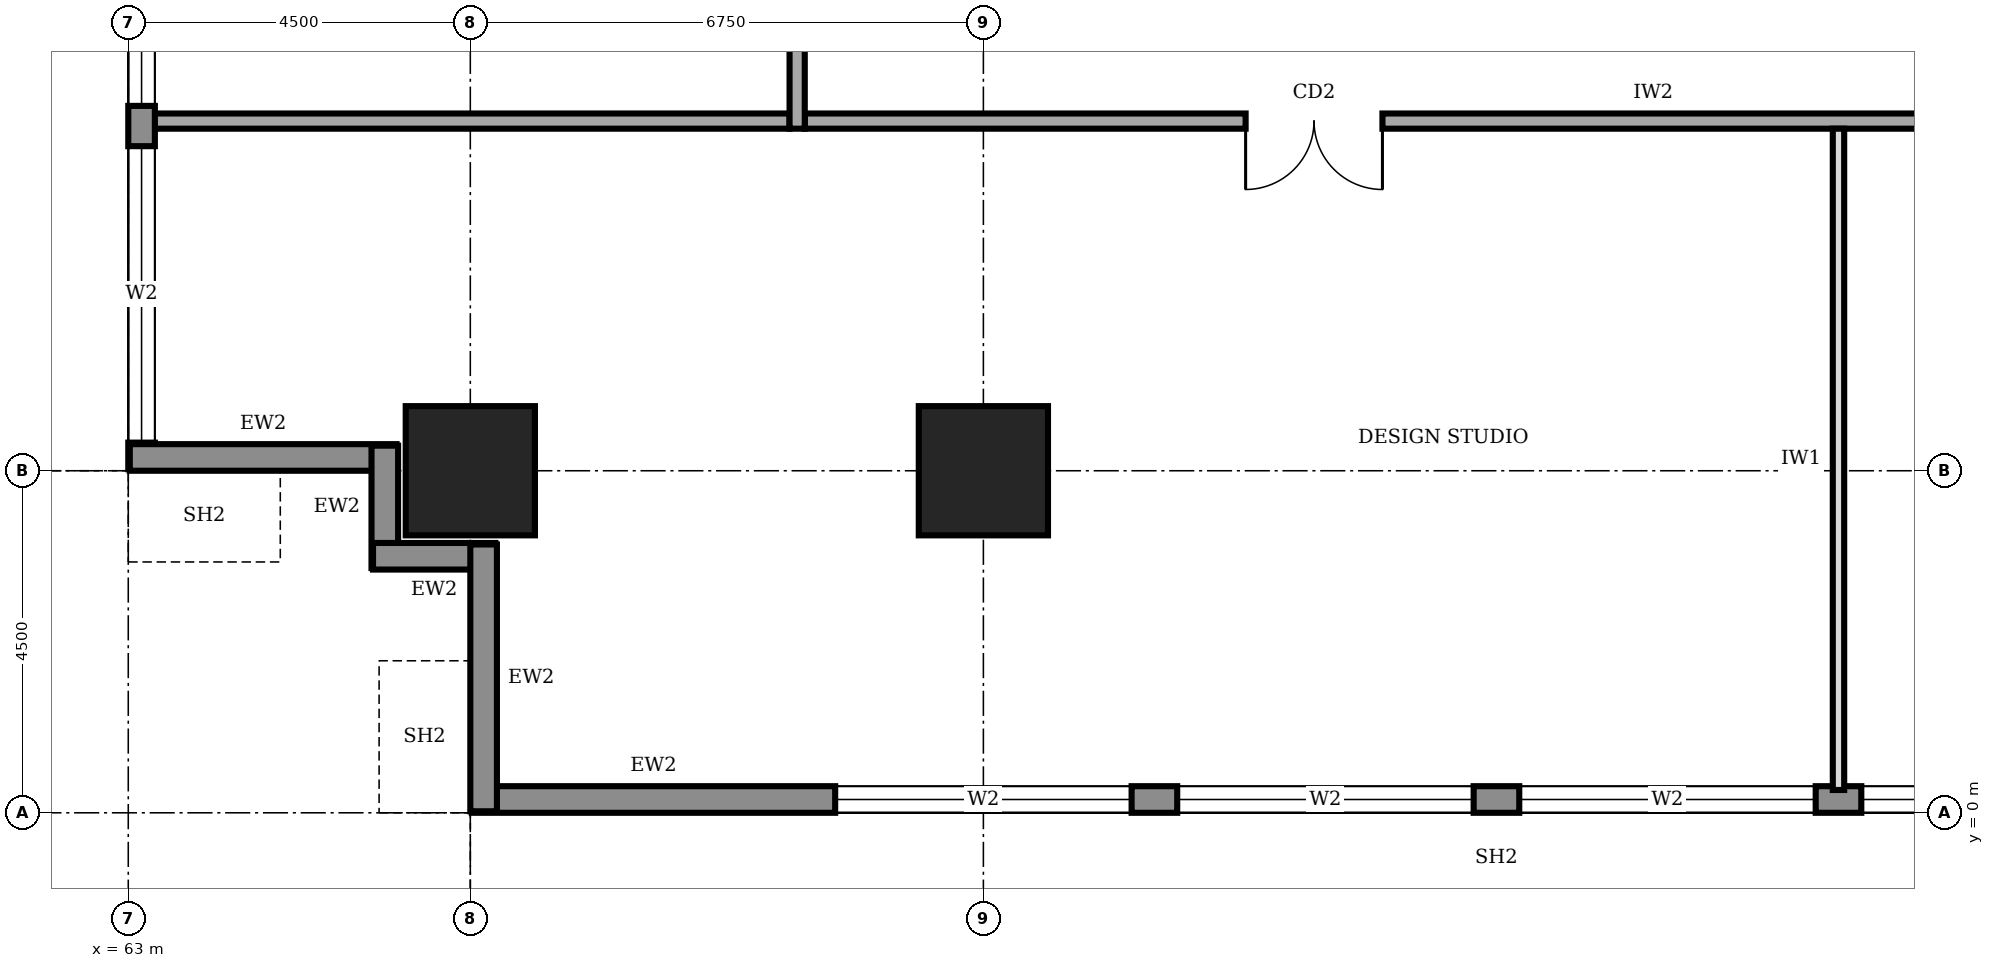
"""IFC4 building model, lengths in metres.
Left out: names, types, materials, properties, quantities, classifications, styles, units other than length and angle.
Written with IfcOpenShell. Run it as: python <this file> out.ifc"""

import sys

from ifc_helpers import new_model, si_unit, direction, frame, frame_2d, origin, origin_2d, place, context, subcontext, project, spatial, rectangle, extrude, element, fill, save


model = new_model("IFC4")
c1 = context("Model", 3, precision=1e-05, world=origin(), true_north=direction((0.0, 1.0)))
c2 = subcontext(c1, "Body", "Model", "MODEL_VIEW")
j1 = project(units=[si_unit("LENGTHUNIT", "METRE"), si_unit("PLANEANGLEUNIT", "RADIAN")], contexts=[c1])
p1 = place(None, origin())
s1 = spatial("IfcSite", under=j1, at=p1, CompositionType="ELEMENT")
p2 = place(p1, origin())
s2 = spatial("IfcBuilding", under=s1, at=p2, CompositionType="ELEMENT")
p3 = place(p2, frame((0.0, 0.0, 53.0)))
s3 = spatial("IfcBuildingStorey", under=s2, at=p3, CompositionType="ELEMENT", Elevation=53.0)
for number, where, z_axis, x_axis in (
    (1, (67.5, 4.5, 0.0), (0.0, 0.0, 1.0), (1.0, 0.0, 0.0)),
    (2, (74.25, 4.5, 0.0), (0.0, 0.0, 1.0), (1.0, 0.0, 0.0)),
):
    element("IfcColumn", number, at=place(p3, frame(where, z_axis=z_axis, x_axis=x_axis)), inside=s3, PredefinedType="COLUMN", context=c2, shape_type="SweptSolid", body=[
        extrude(rectangle(XDim=1.7, YDim=1.7, at=origin_2d()), origin(), (0.0, 0.0, 1.0), 4.0),
    ])
p4 = place(p3, frame((67.52, 0.175, 0.0), z_axis=(0.0, 0.0, 1.0), x_axis=(1.0, 0.0, 0.0)))
e3 = element("IfcWall", 3, at=p4, inside=s3, PredefinedType="STANDARD", context=c2, shape_type="SweptSolid", body=[
    extrude(rectangle(XDim=26.96, YDim=0.35, at=frame_2d((13.48, 0.0))), origin(), (0.0, 0.0, 1.0), 3.75),
])
p5 = place(p4, frame((4.78, 0.0, 0.6)))
e4 = element("IfcOpeningElement", 4, at=p5, cuts=e3, PredefinedType="OPENING", context=c2, shape_type="SweptSolid", body=[
    extrude(rectangle(XDim=3.9, YDim=2.6, at=frame_2d((1.95, 1.3))), frame((0.0, 0.185, 0.0), z_axis=(0.0, -1.0, 0.0), x_axis=(1.0, 0.0, 0.0)), (0.0, 0.0, 1.0), 0.37),
])
p6 = place(p4, frame((9.28, 0.0, 0.6)))
e5 = element("IfcOpeningElement", 5, at=p6, cuts=e3, PredefinedType="OPENING", context=c2, shape_type="SweptSolid", body=[
    extrude(rectangle(XDim=3.9, YDim=2.6, at=frame_2d((1.95, 1.3))), frame((0.0, 0.185, 0.0), z_axis=(0.0, -1.0, 0.0), x_axis=(1.0, 0.0, 0.0)), (0.0, 0.0, 1.0), 0.37),
])
p7 = place(p4, frame((13.78, 0.0, 0.6)))
e6 = element("IfcOpeningElement", 6, at=p7, cuts=e3, PredefinedType="OPENING", context=c2, shape_type="SweptSolid", body=[
    extrude(rectangle(XDim=3.9, YDim=2.6, at=frame_2d((1.95, 1.3))), frame((0.0, 0.185, 0.0), z_axis=(0.0, -1.0, 0.0), x_axis=(1.0, 0.0, 0.0)), (0.0, 0.0, 1.0), 0.37),
])
p8 = place(p4, frame((18.28, 0.0, 0.6)))
e7 = element("IfcOpeningElement", 7, at=p8, cuts=e3, PredefinedType="OPENING", context=c2, shape_type="SweptSolid", body=[
    extrude(rectangle(XDim=3.9, YDim=2.6, at=frame_2d((1.95, 1.3))), frame((0.0, 0.185, 0.0), z_axis=(0.0, -1.0, 0.0), x_axis=(1.0, 0.0, 0.0)), (0.0, 0.0, 1.0), 0.37),
])
p9 = place(p4, frame((22.71, 0.0, 0.6)))
e8 = element("IfcOpeningElement", 8, at=p9, cuts=e3, PredefinedType="OPENING", context=c2, shape_type="SweptSolid", body=[
    extrude(rectangle(XDim=3.9, YDim=2.6, at=frame_2d((1.95, 1.3))), frame((0.0, 0.185, 0.0), z_axis=(0.0, -1.0, 0.0), x_axis=(1.0, 0.0, 0.0)), (0.0, 0.0, 1.0), 0.37),
])
p10 = place(p3, frame((63.175, 35.98, 0.0), z_axis=(0.0, 0.0, 1.0), x_axis=(0.0, -1.0, 0.0)))
e9 = element("IfcWall", 9, at=p10, inside=s3, PredefinedType="STANDARD", context=c2, shape_type="SweptSolid", body=[
    extrude(rectangle(XDim=31.46, YDim=0.35, at=frame_2d((15.73, 0.0))), origin(), (0.0, 0.0, 1.0), 3.75),
])
p11 = place(p10, frame((27.21, 0.0, 0.6)))
e10 = element("IfcOpeningElement", 10, at=p11, cuts=e9, PredefinedType="OPENING", context=c2, shape_type="SweptSolid", body=[
    extrude(rectangle(XDim=3.9, YDim=2.6, at=frame_2d((1.95, 1.3))), frame((0.0, 0.185, 0.0), z_axis=(0.0, -1.0, 0.0), x_axis=(1.0, 0.0, 0.0)), (0.0, 0.0, 1.0), 0.37),
])
p12 = place(p10, frame((22.78, 0.0, 0.6)))
e11 = element("IfcOpeningElement", 11, at=p12, cuts=e9, PredefinedType="OPENING", context=c2, shape_type="SweptSolid", body=[
    extrude(rectangle(XDim=3.9, YDim=2.6, at=frame_2d((1.95, 1.3))), frame((0.0, 0.185, 0.0), z_axis=(0.0, -1.0, 0.0), x_axis=(1.0, 0.0, 0.0)), (0.0, 0.0, 1.0), 0.37),
])
p13 = place(p10, frame((18.28, 0.0, 0.6)))
e12 = element("IfcOpeningElement", 12, at=p13, cuts=e9, PredefinedType="OPENING", context=c2, shape_type="SweptSolid", body=[
    extrude(rectangle(XDim=3.9, YDim=2.6, at=frame_2d((1.95, 1.3))), frame((0.0, 0.185, 0.0), z_axis=(0.0, -1.0, 0.0), x_axis=(1.0, 0.0, 0.0)), (0.0, 0.0, 1.0), 0.37),
])
p14 = place(p10, frame((13.78, 0.0, 0.6)))
e13 = element("IfcOpeningElement", 13, at=p14, cuts=e9, PredefinedType="OPENING", context=c2, shape_type="SweptSolid", body=[
    extrude(rectangle(XDim=3.9, YDim=2.6, at=frame_2d((1.95, 1.3))), frame((0.0, 0.185, 0.0), z_axis=(0.0, -1.0, 0.0), x_axis=(1.0, 0.0, 0.0)), (0.0, 0.0, 1.0), 0.37),
])
p15 = place(p10, frame((9.28, 0.0, 0.6)))
e14 = element("IfcOpeningElement", 14, at=p15, cuts=e9, PredefinedType="OPENING", context=c2, shape_type="SweptSolid", body=[
    extrude(rectangle(XDim=3.9, YDim=2.6, at=frame_2d((1.95, 1.3))), frame((0.0, 0.185, 0.0), z_axis=(0.0, -1.0, 0.0), x_axis=(1.0, 0.0, 0.0)), (0.0, 0.0, 1.0), 0.37),
])
p16 = place(p10, frame((4.78, 0.0, 0.6)))
e15 = element("IfcOpeningElement", 15, at=p16, cuts=e9, PredefinedType="OPENING", context=c2, shape_type="SweptSolid", body=[
    extrude(rectangle(XDim=3.9, YDim=2.6, at=frame_2d((1.95, 1.3))), frame((0.0, 0.185, 0.0), z_axis=(0.0, -1.0, 0.0), x_axis=(1.0, 0.0, 0.0)), (0.0, 0.0, 1.0), 0.37),
])
p17 = place(p3, frame((63.02, 4.675, 0.0), z_axis=(0.0, 0.0, 1.0), x_axis=(1.0, 0.0, 0.0)))
e16 = element("IfcWall", 16, at=p17, inside=s3, PredefinedType="STANDARD", context=c2, shape_type="SweptSolid", body=[
    extrude(rectangle(XDim=3.51, YDim=0.35, at=frame_2d((1.755, 0.0))), origin(), (0.0, 0.0, 1.0), 2.85),
])
for number, where, z_axis, x_axis in (
    (17, (66.375, 4.83, 0.0), (0.0, 0.0, 1.0), (0.0, -1.0, 0.0)),
    (18, (66.22, 3.375, 0.0), (0.0, 0.0, 1.0), (1.0, 0.0, 0.0)),
):
    element("IfcWall", number, at=place(p3, frame(where, z_axis=z_axis, x_axis=x_axis)), inside=s3, PredefinedType="STANDARD", context=c2, shape_type="SweptSolid", body=[
        extrude(rectangle(XDim=1.61, YDim=0.35, at=frame_2d((0.805, 0.0))), origin(), (0.0, 0.0, 1.0), 3.75),
    ])
p18 = place(p3, frame((67.675, 3.53, 0.0), z_axis=(0.0, 0.0, 1.0), x_axis=(0.0, -1.0, 0.0)))
e19 = element("IfcWall", 19, at=p18, inside=s3, PredefinedType="STANDARD", context=c2, shape_type="SweptSolid", body=[
    extrude(rectangle(XDim=3.51, YDim=0.35, at=frame_2d((1.755, 0.0))), origin(), (0.0, 0.0, 1.0), 2.85),
])
p19 = place(p3, frame((71.9, 9.1, 0.0), z_axis=(0.0, 0.0, 1.0), x_axis=(1.0, 0.0, 0.0)))
e20 = element("IfcWall", 20, at=p19, inside=s3, PredefinedType="SOLIDWALL", context=c2, shape_type="SweptSolid", body=[
    extrude(rectangle(XDim=17.65, YDim=0.2, at=frame_2d((8.825, 0.0))), origin(), (0.0, 0.0, 1.0), 3.75),
])
p20 = place(p19, frame((5.8, 0.0, 0.0)))
e21 = element("IfcOpeningElement", 21, at=p20, cuts=e20, PredefinedType="OPENING", context=c2, shape_type="SweptSolid", body=[
    extrude(rectangle(XDim=1.8, YDim=2.1, at=frame_2d((0.9, 1.05))), frame((0.0, 0.11, 0.0), z_axis=(0.0, -1.0, 0.0), x_axis=(1.0, 0.0, 0.0)), (0.0, 0.0, 1.0), 0.22),
])
p21 = place(p19, frame((14.725, 0.0, 0.0)))
e22 = element("IfcOpeningElement", 22, at=p21, cuts=e20, PredefinedType="OPENING", context=c2, shape_type="SweptSolid", body=[
    extrude(rectangle(XDim=1.8, YDim=2.1, at=frame_2d((0.9, 1.05))), frame((0.0, 0.11, 0.0), z_axis=(0.0, -1.0, 0.0), x_axis=(1.0, 0.0, 0.0)), (0.0, 0.0, 1.0), 0.22),
])
p22 = place(p3, frame((71.8, 32.05, 0.0), z_axis=(0.0, 0.0, 1.0), x_axis=(0.0, -1.0, 0.0)))
e23 = element("IfcWall", 23, at=p22, inside=s3, PredefinedType="SOLIDWALL", context=c2, shape_type="SweptSolid", body=[
    extrude(rectangle(XDim=23.05, YDim=0.2, at=frame_2d((11.525, 0.0))), origin(), (0.0, 0.0, 1.0), 3.75),
])
p23 = place(p22, frame((18.05, 0.0, 0.0)))
e24 = element("IfcOpeningElement", 24, at=p23, cuts=e23, PredefinedType="OPENING", context=c2, shape_type="SweptSolid", body=[
    extrude(rectangle(XDim=1.0, YDim=2.1, at=frame_2d((0.5, 1.05))), frame((0.0, 0.11, 0.0), z_axis=(0.0, -1.0, 0.0), x_axis=(1.0, 0.0, 0.0)), (0.0, 0.0, 1.0), 0.22),
])
p24 = place(p22, frame((11.3, 0.0, 0.0)))
e25 = element("IfcOpeningElement", 25, at=p24, cuts=e23, PredefinedType="OPENING", context=c2, shape_type="SweptSolid", body=[
    extrude(rectangle(XDim=1.0, YDim=2.1, at=frame_2d((0.5, 1.05))), frame((0.0, 0.11, 0.0), z_axis=(0.0, -1.0, 0.0), x_axis=(1.0, 0.0, 0.0)), (0.0, 0.0, 1.0), 0.22),
])
p25 = place(p22, frame((4.175, 0.0, 0.0)))
e26 = element("IfcOpeningElement", 26, at=p25, cuts=e23, PredefinedType="OPENING", context=c2, shape_type="SweptSolid", body=[
    extrude(rectangle(XDim=1.0, YDim=2.1, at=frame_2d((0.5, 1.05))), frame((0.0, 0.11, 0.0), z_axis=(0.0, -1.0, 0.0), x_axis=(1.0, 0.0, 0.0)), (0.0, 0.0, 1.0), 0.22),
])
p26 = place(p3, frame((63.3, 9.1, 0.0), z_axis=(0.0, 0.0, 1.0), x_axis=(1.0, 0.0, 0.0)))
e27 = element("IfcWall", 27, at=p26, inside=s3, PredefinedType="SOLIDWALL", context=c2, shape_type="SweptSolid", body=[
    extrude(rectangle(XDim=8.4, YDim=0.2, at=frame_2d((4.2, 0.0))), origin(), (0.0, 0.0, 1.0), 3.75),
])
p27 = place(p3, frame((85.5, 0.3, 0.0), z_axis=(0.0, 0.0, 1.0), x_axis=(0.0, 1.0, 0.0)))
e28 = element("IfcWall", 28, at=p27, inside=s3, PredefinedType="PARTITIONING", context=c2, shape_type="SweptSolid", body=[
    extrude(rectangle(XDim=8.7, YDim=0.15, at=frame_2d((4.35, 0.0))), origin(), (0.0, 0.0, 1.0), 3.75),
])
p28 = place(p5, origin())
e29 = element("IfcWindow", 29, at=p28, inside=s3, PartitioningType="SINGLE_PANEL", PredefinedType="WINDOW", context=c2, shape_type="SweptSolid", body=[
    extrude(rectangle(XDim=3.9, YDim=2.6, at=frame_2d((1.95, 1.3))), frame((0.0, 0.03, 0.0), z_axis=(0.0, -1.0, 0.0), x_axis=(1.0, 0.0, 0.0)), (0.0, 0.0, 1.0), 0.06),
])
fill(e4, e29)
p29 = place(p6, origin())
e30 = element("IfcWindow", 30, at=p29, inside=s3, PartitioningType="SINGLE_PANEL", PredefinedType="WINDOW", context=c2, shape_type="SweptSolid", body=[
    extrude(rectangle(XDim=3.9, YDim=2.6, at=frame_2d((1.95, 1.3))), frame((0.0, 0.03, 0.0), z_axis=(0.0, -1.0, 0.0), x_axis=(1.0, 0.0, 0.0)), (0.0, 0.0, 1.0), 0.06),
])
fill(e5, e30)
p30 = place(p7, origin())
e31 = element("IfcWindow", 31, at=p30, inside=s3, PartitioningType="SINGLE_PANEL", PredefinedType="WINDOW", context=c2, shape_type="SweptSolid", body=[
    extrude(rectangle(XDim=3.9, YDim=2.6, at=frame_2d((1.95, 1.3))), frame((0.0, 0.03, 0.0), z_axis=(0.0, -1.0, 0.0), x_axis=(1.0, 0.0, 0.0)), (0.0, 0.0, 1.0), 0.06),
])
fill(e6, e31)
p31 = place(p8, origin())
e32 = element("IfcWindow", 32, at=p31, inside=s3, PartitioningType="SINGLE_PANEL", PredefinedType="WINDOW", context=c2, shape_type="SweptSolid", body=[
    extrude(rectangle(XDim=3.9, YDim=2.6, at=frame_2d((1.95, 1.3))), frame((0.0, 0.03, 0.0), z_axis=(0.0, -1.0, 0.0), x_axis=(1.0, 0.0, 0.0)), (0.0, 0.0, 1.0), 0.06),
])
fill(e7, e32)
p32 = place(p11, origin())
e33 = element("IfcWindow", 33, at=p32, inside=s3, PartitioningType="SINGLE_PANEL", PredefinedType="WINDOW", context=c2, shape_type="SweptSolid", body=[
    extrude(rectangle(XDim=3.9, YDim=2.6, at=frame_2d((1.95, 1.3))), frame((0.0, 0.03, 0.0), z_axis=(0.0, -1.0, 0.0), x_axis=(1.0, 0.0, 0.0)), (0.0, 0.0, 1.0), 0.06),
])
fill(e10, e33)
p33 = place(p12, origin())
e34 = element("IfcWindow", 34, at=p33, inside=s3, PartitioningType="SINGLE_PANEL", PredefinedType="WINDOW", context=c2, shape_type="SweptSolid", body=[
    extrude(rectangle(XDim=3.9, YDim=2.6, at=frame_2d((1.95, 1.3))), frame((0.0, 0.03, 0.0), z_axis=(0.0, -1.0, 0.0), x_axis=(1.0, 0.0, 0.0)), (0.0, 0.0, 1.0), 0.06),
])
fill(e11, e34)
p34 = place(p20, frame((1.8, 0.0, 0.0), z_axis=(0.0, 0.0, 1.0), x_axis=(-1.0, 0.0, 0.0)))
e35 = element("IfcDoor", 35, at=p34, inside=s3, OperationType="DOUBLE_DOOR_SINGLE_SWING", PredefinedType="DOOR", context=c2, shape_type="SweptSolid", body=[
    extrude(rectangle(XDim=1.8, YDim=2.1, at=frame_2d((0.9, 1.05))), frame((0.0, 0.025, 0.0), z_axis=(0.0, -1.0, 0.0), x_axis=(1.0, 0.0, 0.0)), (0.0, 0.0, 1.0), 0.05),
])
fill(e21, e35)
save(model, sys.argv[1])
